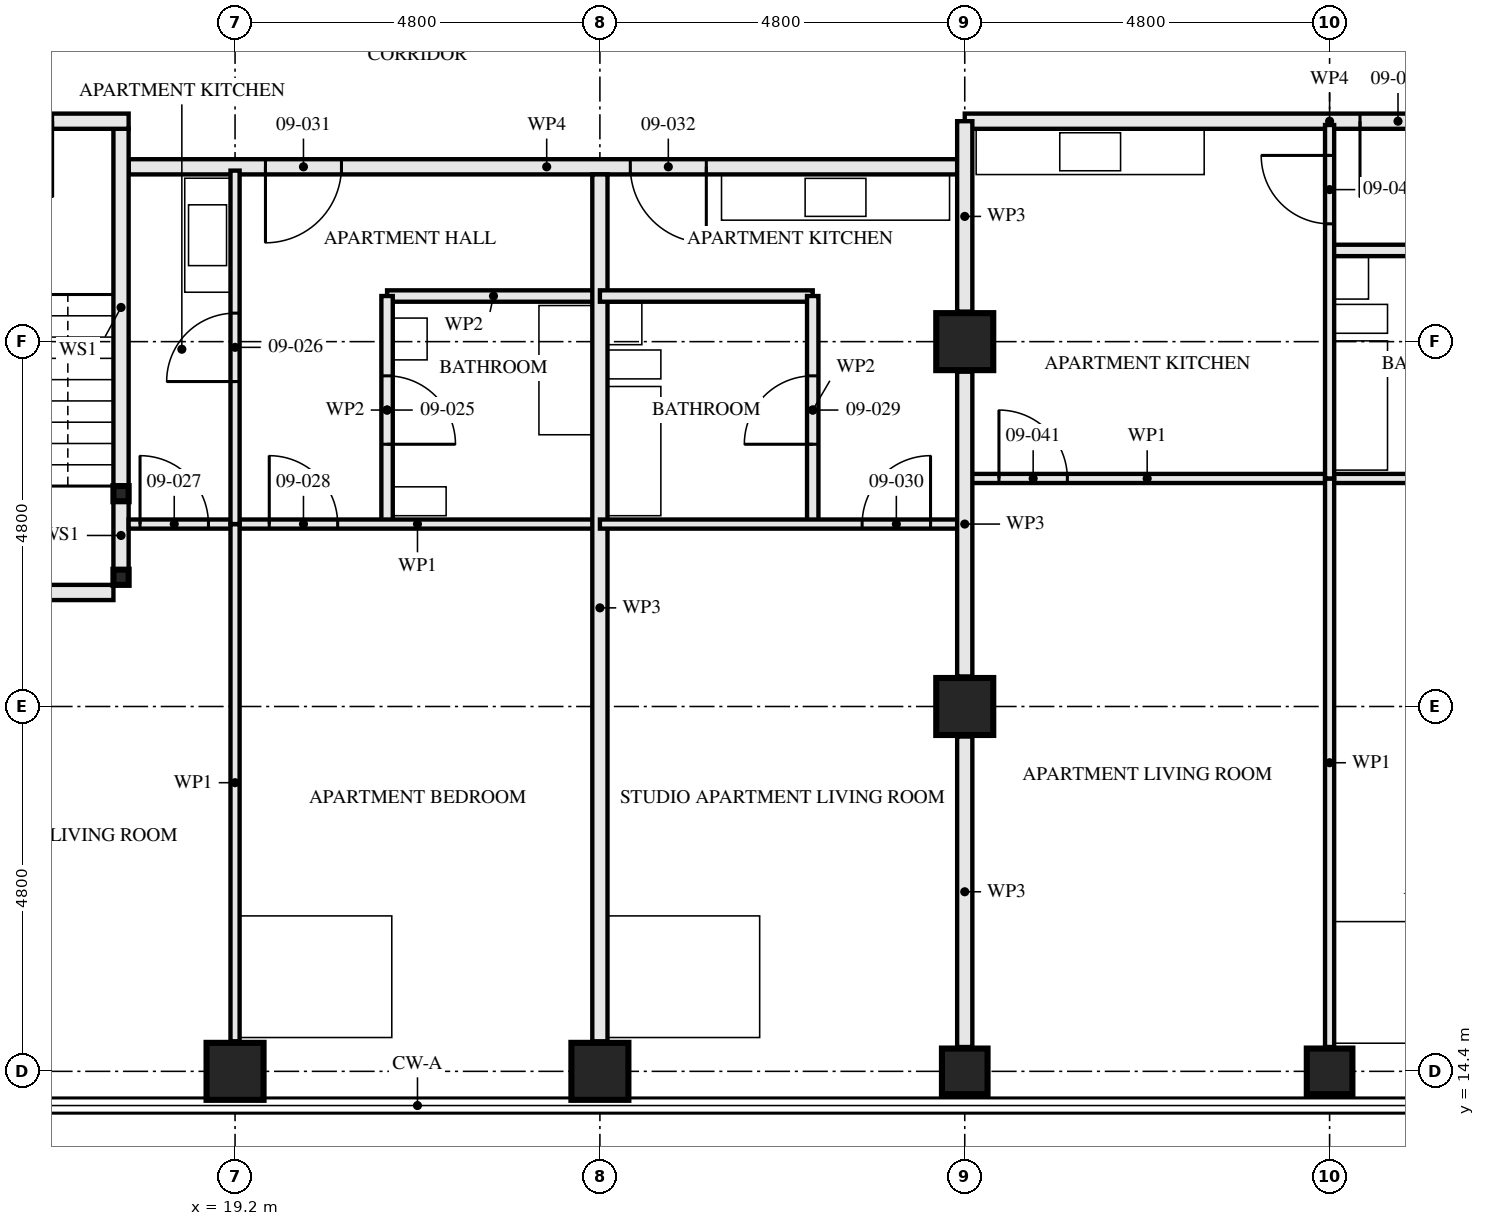
"""IFC4 building model, lengths in metres.
Left out: names, types, materials, properties, quantities, classifications, styles, units other than length and angle.
Written with IfcOpenShell. Run it as: python <this file> out.ifc"""

import sys

from ifc_helpers import new_model, si_unit, direction, frame, frame_2d, origin, origin_2d, place, context, subcontext, project, spatial, rectangle, hollow_rectangle, extrude, element, fill, save


model = new_model("IFC4")
c1 = context("Model", 3, precision=1e-05, world=origin(), true_north=direction((0.0, 1.0)))
c2 = subcontext(c1, "Body", "Model", "MODEL_VIEW")
j1 = project(units=[si_unit("LENGTHUNIT", "METRE"), si_unit("PLANEANGLEUNIT", "RADIAN")], contexts=[c1])
p1 = place(None, origin())
s1 = spatial("IfcSite", under=j1, at=p1, CompositionType="ELEMENT")
p2 = place(p1, origin())
s2 = spatial("IfcBuilding", under=s1, at=p2, CompositionType="ELEMENT")
p3 = place(p2, frame((0.0, 0.0, 37.5)))
s3 = spatial("IfcBuildingStorey", under=s2, at=p3, CompositionType="ELEMENT", Elevation=37.5)
for number, where, z_axis, x_axis in (
    (1, (19.2, 14.4, 0.0), (0.0, 0.0, 1.0), (0.0, 1.0, 0.0)),
    (2, (24.0, 14.4, 0.0), (0.0, 0.0, 1.0), (0.0, 1.0, 0.0)),
):
    element("IfcColumn", number, at=place(p3, frame(where, z_axis=z_axis, x_axis=x_axis)), inside=s3, PredefinedType="COLUMN", context=c2, shape_type="SweptSolid", body=[
        extrude(hollow_rectangle(XDim=0.75, YDim=0.75, WallThickness=0.08, at=origin_2d()), origin(), (0.0, 0.0, 1.0), 3.5),
    ])
p4 = place(p3, frame((28.8, 14.4, 0.0), z_axis=(0.0, 0.0, 1.0), x_axis=(0.0, 1.0, 0.0)))
e3 = element("IfcColumn", 3, at=p4, inside=s3, PredefinedType="COLUMN", context=c2, shape_type="SweptSolid", body=[
    extrude(hollow_rectangle(XDim=0.6, YDim=0.6, WallThickness=0.08, at=origin_2d()), origin(), (0.0, 0.0, 1.0), 3.5),
])
for number, where, z_axis, x_axis in (
    (4, (28.8, 19.2, 0.0), (0.0, 0.0, 1.0), (1.0, 0.0, 0.0)),
    (5, (28.8, 24.0, 0.0), (0.0, 0.0, 1.0), (1.0, 0.0, 0.0)),
):
    element("IfcColumn", number, at=place(p3, frame(where, z_axis=z_axis, x_axis=x_axis)), inside=s3, PredefinedType="COLUMN", context=c2, shape_type="SweptSolid", body=[
        extrude(hollow_rectangle(XDim=0.75, YDim=0.75, WallThickness=0.08, at=origin_2d()), origin(), (0.0, 0.0, 1.0), 3.5),
    ])
p5 = place(p3, frame((33.6, 14.4, 0.0), z_axis=(0.0, 0.0, 1.0), x_axis=(0.0, 1.0, 0.0)))
e6 = element("IfcColumn", 6, at=p5, inside=s3, PredefinedType="COLUMN", context=c2, shape_type="SweptSolid", body=[
    extrude(hollow_rectangle(XDim=0.6, YDim=0.6, WallThickness=0.08, at=origin_2d()), origin(), (0.0, 0.0, 1.0), 3.5),
])
for number, where, z_axis, x_axis in (
    (7, (17.7, 20.9, 0.0), (0.0, 0.0, 1.0), (1.0, 0.0, 0.0)),
    (8, (17.7, 22.0, 0.0), (0.0, 0.0, 1.0), (1.0, 0.0, 0.0)),
):
    element("IfcColumn", number, at=place(p3, frame(where, z_axis=z_axis, x_axis=x_axis)), inside=s3, PredefinedType="COLUMN", context=c2, shape_type="SweptSolid", body=[
        extrude(hollow_rectangle(XDim=0.2, YDim=0.2, WallThickness=0.008, at=origin_2d()), origin(), (0.0, 0.0, 1.0), 3.33),
    ])
p6 = place(p3, frame((17.7, 21.0, 0.0), z_axis=(0.0, 0.0, 1.0), x_axis=(0.0, 1.0, 0.0)))
e9 = element("IfcWall", 9, at=p6, inside=s3, PredefinedType="SOLIDWALL", context=c2, shape_type="SweptSolid", body=[
    extrude(rectangle(XDim=0.9, YDim=0.2, at=frame_2d((0.45, 0.0))), origin(), (0.0, 0.0, 1.0), 2.99),
])
p7 = place(p3, frame((17.7, 22.1, 0.0), z_axis=(0.0, 0.0, 1.0), x_axis=(0.0, 1.0, 0.0)))
e10 = element("IfcWall", 10, at=p7, inside=s3, PredefinedType="SOLIDWALL", context=c2, shape_type="SweptSolid", body=[
    extrude(rectangle(XDim=4.7, YDim=0.2, at=frame_2d((2.35, 0.0))), origin(), (0.0, 0.0, 1.0), 2.99),
])
p8 = place(p3, frame((15.0, 20.7, 0.0), z_axis=(0.0, 0.0, 1.0), x_axis=(1.0, 0.0, 0.0)))
e11 = element("IfcWall", 11, at=p8, inside=s3, PredefinedType="SOLIDWALL", context=c2, shape_type="SweptSolid", body=[
    extrude(rectangle(XDim=2.6, YDim=0.2, at=frame_2d((1.3, 0.0))), origin(), (0.0, 0.0, 1.0), 3.33),
])
p9 = place(p3, frame((14.4, 26.9, 0.0), z_axis=(0.0, 0.0, 1.0), x_axis=(1.0, 0.0, 0.0)))
e12 = element("IfcWall", 12, at=p9, inside=s3, PredefinedType="SOLIDWALL", context=c2, shape_type="SweptSolid", body=[
    extrude(rectangle(XDim=3.4, YDim=0.2, at=frame_2d((1.7, 0.0))), origin(), (0.0, 0.0, 1.0), 3.33),
])
p10 = place(p9, frame((1.4, 0.0, 0.0)))
e13 = element("IfcOpeningElement", 13, at=p10, cuts=e12, PredefinedType="OPENING", context=c2, shape_type="SweptSolid", body=[
    extrude(rectangle(XDim=1.0, YDim=2.1, at=frame_2d((0.5, 1.05))), frame((0.0, 0.111, 0.0), z_axis=(0.0, -1.0, 0.0), x_axis=(1.0, 0.0, 0.0)), (0.0, 0.0, 1.0), 0.221),
])
p11 = place(p3, frame((21.2, 21.6, 0.0), z_axis=(0.0, 0.0, 1.0), x_axis=(0.0, 1.0, 0.0)))
e14 = element("IfcWall", 14, at=p11, inside=s3, PredefinedType="PARTITIONING", context=c2, shape_type="SweptSolid", body=[
    extrude(rectangle(XDim=3.0, YDim=0.15, at=frame_2d((1.5, 0.0))), origin(), (0.0, 0.0, 1.0), 2.55),
])
p12 = place(p11, frame((1.05, 0.0, 0.0)))
e15 = element("IfcOpeningElement", 15, at=p12, cuts=e14, PredefinedType="OPENING", context=c2, shape_type="SweptSolid", body=[
    extrude(rectangle(XDim=0.9, YDim=2.1, at=frame_2d((0.45, 1.05))), frame((0.0, 0.085, 0.0), z_axis=(0.0, -1.0, 0.0), x_axis=(1.0, 0.0, 0.0)), (0.0, 0.0, 1.0), 0.171),
])
p13 = place(p3, frame((21.2, 24.6, 0.0), z_axis=(0.0, 0.0, 1.0), x_axis=(1.0, 0.0, 0.0)))
e16 = element("IfcWall", 16, at=p13, inside=s3, PredefinedType="PARTITIONING", context=c2, shape_type="SweptSolid", body=[
    extrude(rectangle(XDim=2.8, YDim=0.15, at=frame_2d((1.4, 0.0))), origin(), (0.0, 0.0, 1.0), 3.33),
])
p14 = place(p3, frame((19.2, 21.6, 0.0), z_axis=(0.0, 0.0, 1.0), x_axis=(0.0, 1.0, 0.0)))
e17 = element("IfcWall", 17, at=p14, inside=s3, PredefinedType="PARTITIONING", context=c2, shape_type="SweptSolid", body=[
    extrude(rectangle(XDim=4.65, YDim=0.12, at=frame_2d((2.325, 0.0))), origin(), (0.0, 0.0, 1.0), 2.55),
])
p15 = place(p14, frame((1.875, 0.0, 0.0)))
e18 = element("IfcOpeningElement", 18, at=p15, cuts=e17, PredefinedType="OPENING", context=c2, shape_type="SweptSolid", body=[
    extrude(rectangle(XDim=0.9, YDim=2.1, at=frame_2d((0.45, 1.05))), frame((0.0, 0.071, 0.0), z_axis=(0.0, -1.0, 0.0), x_axis=(1.0, 0.0, 0.0)), (0.0, 0.0, 1.0), 0.141),
])
p16 = place(p3, frame((17.8, 21.6, 0.0), z_axis=(0.0, 0.0, 1.0), x_axis=(1.0, 0.0, 0.0)))
e19 = element("IfcWall", 19, at=p16, inside=s3, PredefinedType="PARTITIONING", context=c2, shape_type="SweptSolid", body=[
    extrude(rectangle(XDim=1.4, YDim=0.12, at=frame_2d((0.7, 0.0))), origin(), (0.0, 0.0, 1.0), 3.33),
])
p17 = place(p16, frame((0.15, 0.0, 0.0)))
e20 = element("IfcOpeningElement", 20, at=p17, cuts=e19, PredefinedType="OPENING", context=c2, shape_type="SweptSolid", body=[
    extrude(rectangle(XDim=0.9, YDim=2.1, at=frame_2d((0.45, 1.05))), frame((0.0, 0.071, 0.0), z_axis=(0.0, -1.0, 0.0), x_axis=(1.0, 0.0, 0.0)), (0.0, 0.0, 1.0), 0.141),
])
p18 = place(p3, frame((19.2, 21.6, 0.0), z_axis=(0.0, 0.0, 1.0), x_axis=(1.0, 0.0, 0.0)))
e21 = element("IfcWall", 21, at=p18, inside=s3, PredefinedType="PARTITIONING", context=c2, shape_type="SweptSolid", body=[
    extrude(rectangle(XDim=4.8, YDim=0.12, at=frame_2d((2.4, 0.0))), origin(), (0.0, 0.0, 1.0), 3.33),
])
p19 = place(p18, frame((0.45, 0.0, 0.0)))
e22 = element("IfcOpeningElement", 22, at=p19, cuts=e21, PredefinedType="OPENING", context=c2, shape_type="SweptSolid", body=[
    extrude(rectangle(XDim=0.9, YDim=2.1, at=frame_2d((0.45, 1.05))), frame((0.0, 0.071, 0.0), z_axis=(0.0, -1.0, 0.0), x_axis=(1.0, 0.0, 0.0)), (0.0, 0.0, 1.0), 0.141),
])
p20 = place(p3, frame((19.2, 14.795, 0.0), z_axis=(0.0, 0.0, 1.0), x_axis=(0.0, 1.0, 0.0)))
e23 = element("IfcWall", 23, at=p20, inside=s3, PredefinedType="PARTITIONING", context=c2, shape_type="SweptSolid", body=[
    extrude(rectangle(XDim=6.805, YDim=0.12, at=frame_2d((3.403, 0.0))), origin(), (0.0, 0.0, 1.0), 2.55),
])
p21 = place(p3, frame((24.0, 14.795, 0.0), z_axis=(0.0, 0.0, 1.0), x_axis=(0.0, 1.0, 0.0)))
e24 = element("IfcWall", 24, at=p21, inside=s3, PredefinedType="PARTITIONING", context=c2, shape_type="SweptSolid", body=[
    extrude(rectangle(XDim=11.405, YDim=0.2, at=frame_2d((5.703, 0.0))), origin(), (0.0, 0.0, 1.0), 2.55),
])
p22 = place(p3, frame((26.8, 21.6, 0.0), z_axis=(0.0, 0.0, 1.0), x_axis=(0.0, 1.0, 0.0)))
e25 = element("IfcWall", 25, at=p22, inside=s3, PredefinedType="PARTITIONING", context=c2, shape_type="SweptSolid", body=[
    extrude(rectangle(XDim=3.0, YDim=0.15, at=frame_2d((1.5, 0.0))), origin(), (0.0, 0.0, 1.0), 2.55),
])
p23 = place(p22, frame((1.05, 0.0, 0.0)))
e26 = element("IfcOpeningElement", 26, at=p23, cuts=e25, PredefinedType="OPENING", context=c2, shape_type="SweptSolid", body=[
    extrude(rectangle(XDim=0.9, YDim=2.1, at=frame_2d((0.45, 1.05))), frame((0.0, 0.085, 0.0), z_axis=(0.0, -1.0, 0.0), x_axis=(1.0, 0.0, 0.0)), (0.0, 0.0, 1.0), 0.171),
])
p24 = place(p3, frame((24.0, 24.6, 0.0), z_axis=(0.0, 0.0, 1.0), x_axis=(1.0, 0.0, 0.0)))
e27 = element("IfcWall", 27, at=p24, inside=s3, PredefinedType="PARTITIONING", context=c2, shape_type="SweptSolid", body=[
    extrude(rectangle(XDim=2.8, YDim=0.15, at=frame_2d((1.4, 0.0))), origin(), (0.0, 0.0, 1.0), 3.33),
])
p25 = place(p3, frame((24.0, 21.6, 0.0), z_axis=(0.0, 0.0, 1.0), x_axis=(1.0, 0.0, 0.0)))
e28 = element("IfcWall", 28, at=p25, inside=s3, PredefinedType="PARTITIONING", context=c2, shape_type="SweptSolid", body=[
    extrude(rectangle(XDim=4.8, YDim=0.12, at=frame_2d((2.4, 0.0))), origin(), (0.0, 0.0, 1.0), 3.33),
])
p26 = place(p25, frame((3.45, 0.0, 0.0)))
e29 = element("IfcOpeningElement", 29, at=p26, cuts=e28, PredefinedType="OPENING", context=c2, shape_type="SweptSolid", body=[
    extrude(rectangle(XDim=0.9, YDim=2.1, at=frame_2d((0.45, 1.05))), frame((0.0, 0.071, 0.0), z_axis=(0.0, -1.0, 0.0), x_axis=(1.0, 0.0, 0.0)), (0.0, 0.0, 1.0), 0.141),
])
p27 = place(p3, frame((17.8, 26.3, 0.0), z_axis=(0.0, 0.0, 1.0), x_axis=(1.0, 0.0, 0.0)))
e30 = element("IfcWall", 30, at=p27, inside=s3, PredefinedType="PARTITIONING", context=c2, shape_type="SweptSolid", body=[
    extrude(rectangle(XDim=11.0, YDim=0.2, at=frame_2d((5.5, 0.0))), origin(), (0.0, 0.0, 1.0), 2.55),
])
p28 = place(p27, frame((1.8, 0.0, 0.0)))
e31 = element("IfcOpeningElement", 31, at=p28, cuts=e30, PredefinedType="OPENING", context=c2, shape_type="SweptSolid", body=[
    extrude(rectangle(XDim=1.0, YDim=2.1, at=frame_2d((0.5, 1.05))), frame((0.0, 0.111, 0.0), z_axis=(0.0, -1.0, 0.0), x_axis=(1.0, 0.0, 0.0)), (0.0, 0.0, 1.0), 0.221),
])
p29 = place(p27, frame((6.6, 0.0, 0.0)))
e32 = element("IfcOpeningElement", 32, at=p29, cuts=e30, PredefinedType="OPENING", context=c2, shape_type="SweptSolid", body=[
    extrude(rectangle(XDim=1.0, YDim=2.1, at=frame_2d((0.5, 1.05))), frame((0.0, 0.111, 0.0), z_axis=(0.0, -1.0, 0.0), x_axis=(1.0, 0.0, 0.0)), (0.0, 0.0, 1.0), 0.221),
])
p30 = place(p3, frame((33.6, 25.2, 0.0), z_axis=(0.0, 0.0, 1.0), x_axis=(1.0, 0.0, 0.0)))
e33 = element("IfcWall", 33, at=p30, inside=s3, PredefinedType="PARTITIONING", context=c2, shape_type="SweptSolid", body=[
    extrude(rectangle(XDim=2.8, YDim=0.15, at=frame_2d((1.4, 0.0))), origin(), (0.0, 0.0, 1.0), 3.33),
])
p31 = place(p3, frame((33.6, 22.2, 0.0), z_axis=(0.0, 0.0, 1.0), x_axis=(0.0, 1.0, 0.0)))
e34 = element("IfcWall", 34, at=p31, inside=s3, PredefinedType="PARTITIONING", context=c2, shape_type="SweptSolid", body=[
    extrude(rectangle(XDim=4.65, YDim=0.12, at=frame_2d((2.325, 0.0))), origin(), (0.0, 0.0, 1.0), 2.55),
])
p32 = place(p31, frame((3.35, 0.0, 0.0)))
e35 = element("IfcOpeningElement", 35, at=p32, cuts=e34, PredefinedType="OPENING", context=c2, shape_type="SweptSolid", body=[
    extrude(rectangle(XDim=0.9, YDim=2.1, at=frame_2d((0.45, 1.05))), frame((0.0, 0.071, 0.0), z_axis=(0.0, -1.0, 0.0), x_axis=(1.0, 0.0, 0.0)), (0.0, 0.0, 1.0), 0.141),
])
p33 = place(p3, frame((28.8, 22.2, 0.0), z_axis=(0.0, 0.0, 1.0), x_axis=(1.0, 0.0, 0.0)))
e36 = element("IfcWall", 36, at=p33, inside=s3, PredefinedType="PARTITIONING", context=c2, shape_type="SweptSolid", body=[
    extrude(rectangle(XDim=4.8, YDim=0.12, at=frame_2d((2.4, 0.0))), origin(), (0.0, 0.0, 1.0), 3.33),
])
p34 = place(p33, frame((0.45, 0.0, 0.0)))
e37 = element("IfcOpeningElement", 37, at=p34, cuts=e36, PredefinedType="OPENING", context=c2, shape_type="SweptSolid", body=[
    extrude(rectangle(XDim=0.9, YDim=2.1, at=frame_2d((0.45, 1.05))), frame((0.0, 0.071, 0.0), z_axis=(0.0, -1.0, 0.0), x_axis=(1.0, 0.0, 0.0)), (0.0, 0.0, 1.0), 0.141),
])
p35 = place(p3, frame((33.6, 22.2, 0.0), z_axis=(0.0, 0.0, 1.0), x_axis=(1.0, 0.0, 0.0)))
e38 = element("IfcWall", 38, at=p35, inside=s3, PredefinedType="PARTITIONING", context=c2, shape_type="SweptSolid", body=[
    extrude(rectangle(XDim=4.8, YDim=0.12, at=frame_2d((2.4, 0.0))), origin(), (0.0, 0.0, 1.0), 3.33),
])
p36 = place(p35, frame((3.45, 0.0, 0.0)))
e39 = element("IfcOpeningElement", 39, at=p36, cuts=e38, PredefinedType="OPENING", context=c2, shape_type="SweptSolid", body=[
    extrude(rectangle(XDim=0.9, YDim=2.1, at=frame_2d((0.45, 1.05))), frame((0.0, 0.071, 0.0), z_axis=(0.0, -1.0, 0.0), x_axis=(1.0, 0.0, 0.0)), (0.0, 0.0, 1.0), 0.141),
])
p37 = place(p3, frame((33.6, 14.72, 0.0), z_axis=(0.0, 0.0, 1.0), x_axis=(0.0, 1.0, 0.0)))
e40 = element("IfcWall", 40, at=p37, inside=s3, PredefinedType="PARTITIONING", context=c2, shape_type="SweptSolid", body=[
    extrude(rectangle(XDim=7.48, YDim=0.12, at=frame_2d((3.74, 0.0))), origin(), (0.0, 0.0, 1.0), 2.55),
])
p38 = place(p3, frame((28.8, 26.9, 0.0), z_axis=(0.0, 0.0, 1.0), x_axis=(1.0, 0.0, 0.0)))
e41 = element("IfcWall", 41, at=p38, inside=s3, PredefinedType="PARTITIONING", context=c2, shape_type="SweptSolid", body=[
    extrude(rectangle(XDim=9.6, YDim=0.2, at=frame_2d((4.8, 0.0))), origin(), (0.0, 0.0, 1.0), 3.33),
])
p39 = place(p38, frame((5.2, 0.0, 0.0)))
e42 = element("IfcOpeningElement", 42, at=p39, cuts=e41, PredefinedType="OPENING", context=c2, shape_type="SweptSolid", body=[
    extrude(rectangle(XDim=1.0, YDim=2.1, at=frame_2d((0.5, 1.05))), frame((0.0, 0.111, 0.0), z_axis=(0.0, -1.0, 0.0), x_axis=(1.0, 0.0, 0.0)), (0.0, 0.0, 1.0), 0.221),
])
p40 = place(p3, frame((28.8, 14.72, 0.0), z_axis=(0.0, 0.0, 1.0), x_axis=(0.0, 1.0, 0.0)))
e43 = element("IfcWall", 43, at=p40, inside=s3, PredefinedType="PARTITIONING", context=c2, shape_type="SweptSolid", body=[
    extrude(rectangle(XDim=4.085, YDim=0.2, at=frame_2d((2.042, 0.0))), origin(), (0.0, 0.0, 1.0), 2.32),
])
p41 = place(p3, frame((28.8, 19.595, 0.0), z_axis=(0.0, 0.0, 1.0), x_axis=(0.0, 1.0, 0.0)))
e44 = element("IfcWall", 44, at=p41, inside=s3, PredefinedType="PARTITIONING", context=c2, shape_type="SweptSolid", body=[
    extrude(rectangle(XDim=4.01, YDim=0.2, at=frame_2d((2.005, 0.0))), origin(), (0.0, 0.0, 1.0), 2.32),
])
p42 = place(p3, frame((28.8, 24.395, 0.0), z_axis=(0.0, 0.0, 1.0), x_axis=(0.0, 1.0, 0.0)))
e45 = element("IfcWall", 45, at=p42, inside=s3, PredefinedType="PARTITIONING", context=c2, shape_type="SweptSolid", body=[
    extrude(rectangle(XDim=2.505, YDim=0.2, at=frame_2d((1.252, 0.0))), origin(), (0.0, 0.0, 1.0), 2.32),
])
p43 = place(p12, frame((0.9, 0.0, 0.0), z_axis=(0.0, 0.0, 1.0), x_axis=(-1.0, 0.0, 0.0)))
e46 = element("IfcDoor", 46, at=p43, inside=s3, OperationType="SINGLE_SWING_LEFT", PredefinedType="DOOR", context=c2, shape_type="SweptSolid", body=[
    extrude(rectangle(XDim=0.9, YDim=2.1, at=frame_2d((0.45, 1.05))), frame((0.0, 0.022, 0.0), z_axis=(0.0, -1.0, 0.0), x_axis=(1.0, 0.0, 0.0)), (0.0, 0.0, 1.0), 0.044),
])
fill(e15, e46)
p44 = place(p15, origin())
e47 = element("IfcDoor", 47, at=p44, inside=s3, OperationType="SINGLE_SWING_RIGHT", PredefinedType="DOOR", context=c2, shape_type="SweptSolid", body=[
    extrude(rectangle(XDim=0.9, YDim=2.1, at=frame_2d((0.45, 1.05))), frame((0.0, 0.022, 0.0), z_axis=(0.0, -1.0, 0.0), x_axis=(1.0, 0.0, 0.0)), (0.0, 0.0, 1.0), 0.044),
])
fill(e18, e47)
p45 = place(p17, origin())
e48 = element("IfcDoor", 48, at=p45, inside=s3, OperationType="SINGLE_SWING_RIGHT", PredefinedType="DOOR", context=c2, shape_type="SweptSolid", body=[
    extrude(rectangle(XDim=0.9, YDim=2.1, at=frame_2d((0.45, 1.05))), frame((0.0, 0.022, 0.0), z_axis=(0.0, -1.0, 0.0), x_axis=(1.0, 0.0, 0.0)), (0.0, 0.0, 1.0), 0.044),
])
fill(e20, e48)
p46 = place(p19, origin())
e49 = element("IfcDoor", 49, at=p46, inside=s3, OperationType="SINGLE_SWING_RIGHT", PredefinedType="DOOR", context=c2, shape_type="SweptSolid", body=[
    extrude(rectangle(XDim=0.9, YDim=2.1, at=frame_2d((0.45, 1.05))), frame((0.0, 0.022, 0.0), z_axis=(0.0, -1.0, 0.0), x_axis=(1.0, 0.0, 0.0)), (0.0, 0.0, 1.0), 0.044),
])
fill(e22, e49)
p47 = place(p23, origin())
e50 = element("IfcDoor", 50, at=p47, inside=s3, OperationType="SINGLE_SWING_RIGHT", PredefinedType="DOOR", context=c2, shape_type="SweptSolid", body=[
    extrude(rectangle(XDim=0.9, YDim=2.1, at=frame_2d((0.45, 1.05))), frame((0.0, 0.022, 0.0), z_axis=(0.0, -1.0, 0.0), x_axis=(1.0, 0.0, 0.0)), (0.0, 0.0, 1.0), 0.044),
])
fill(e26, e50)
p48 = place(p26, origin())
e51 = element("IfcDoor", 51, at=p48, inside=s3, OperationType="SINGLE_SWING_LEFT", PredefinedType="DOOR", context=c2, shape_type="SweptSolid", body=[
    extrude(rectangle(XDim=0.9, YDim=2.1, at=frame_2d((0.45, 1.05))), frame((0.0, 0.022, 0.0), z_axis=(0.0, -1.0, 0.0), x_axis=(1.0, 0.0, 0.0)), (0.0, 0.0, 1.0), 0.044),
])
fill(e29, e51)
p49 = place(p28, frame((1.0, 0.0, 0.0), z_axis=(0.0, 0.0, 1.0), x_axis=(-1.0, 0.0, 0.0)))
e52 = element("IfcDoor", 52, at=p49, inside=s3, OperationType="SINGLE_SWING_LEFT", PredefinedType="DOOR", context=c2, shape_type="SweptSolid", body=[
    extrude(rectangle(XDim=1.0, YDim=2.1, at=frame_2d((0.5, 1.05))), frame((0.0, 0.027, 0.0), z_axis=(0.0, -1.0, 0.0), x_axis=(1.0, 0.0, 0.0)), (0.0, 0.0, 1.0), 0.054),
])
fill(e31, e52)
p50 = place(p29, frame((1.0, 0.0, 0.0), z_axis=(0.0, 0.0, 1.0), x_axis=(-1.0, 0.0, 0.0)))
e53 = element("IfcDoor", 53, at=p50, inside=s3, OperationType="SINGLE_SWING_RIGHT", PredefinedType="DOOR", context=c2, shape_type="SweptSolid", body=[
    extrude(rectangle(XDim=1.0, YDim=2.1, at=frame_2d((0.5, 1.05))), frame((0.0, 0.027, 0.0), z_axis=(0.0, -1.0, 0.0), x_axis=(1.0, 0.0, 0.0)), (0.0, 0.0, 1.0), 0.054),
])
fill(e32, e53)
p51 = place(p32, origin())
e54 = element("IfcDoor", 54, at=p51, inside=s3, OperationType="SINGLE_SWING_LEFT", PredefinedType="DOOR", context=c2, shape_type="SweptSolid", body=[
    extrude(rectangle(XDim=0.9, YDim=2.1, at=frame_2d((0.45, 1.05))), frame((0.0, 0.022, 0.0), z_axis=(0.0, -1.0, 0.0), x_axis=(1.0, 0.0, 0.0)), (0.0, 0.0, 1.0), 0.044),
])
fill(e35, e54)
p52 = place(p34, origin())
e55 = element("IfcDoor", 55, at=p52, inside=s3, OperationType="SINGLE_SWING_RIGHT", PredefinedType="DOOR", context=c2, shape_type="SweptSolid", body=[
    extrude(rectangle(XDim=0.9, YDim=2.1, at=frame_2d((0.45, 1.05))), frame((0.0, 0.022, 0.0), z_axis=(0.0, -1.0, 0.0), x_axis=(1.0, 0.0, 0.0)), (0.0, 0.0, 1.0), 0.044),
])
fill(e37, e55)
p53 = place(p39, frame((1.0, 0.0, 0.0), z_axis=(0.0, 0.0, 1.0), x_axis=(-1.0, 0.0, 0.0)))
e56 = element("IfcDoor", 56, at=p53, inside=s3, OperationType="SINGLE_SWING_LEFT", PredefinedType="DOOR", context=c2, shape_type="SweptSolid", body=[
    extrude(rectangle(XDim=1.0, YDim=2.1, at=frame_2d((0.5, 1.05))), frame((0.0, 0.027, 0.0), z_axis=(0.0, -1.0, 0.0), x_axis=(1.0, 0.0, 0.0)), (0.0, 0.0, 1.0), 0.054),
])
fill(e42, e56)
save(model, sys.argv[1])
